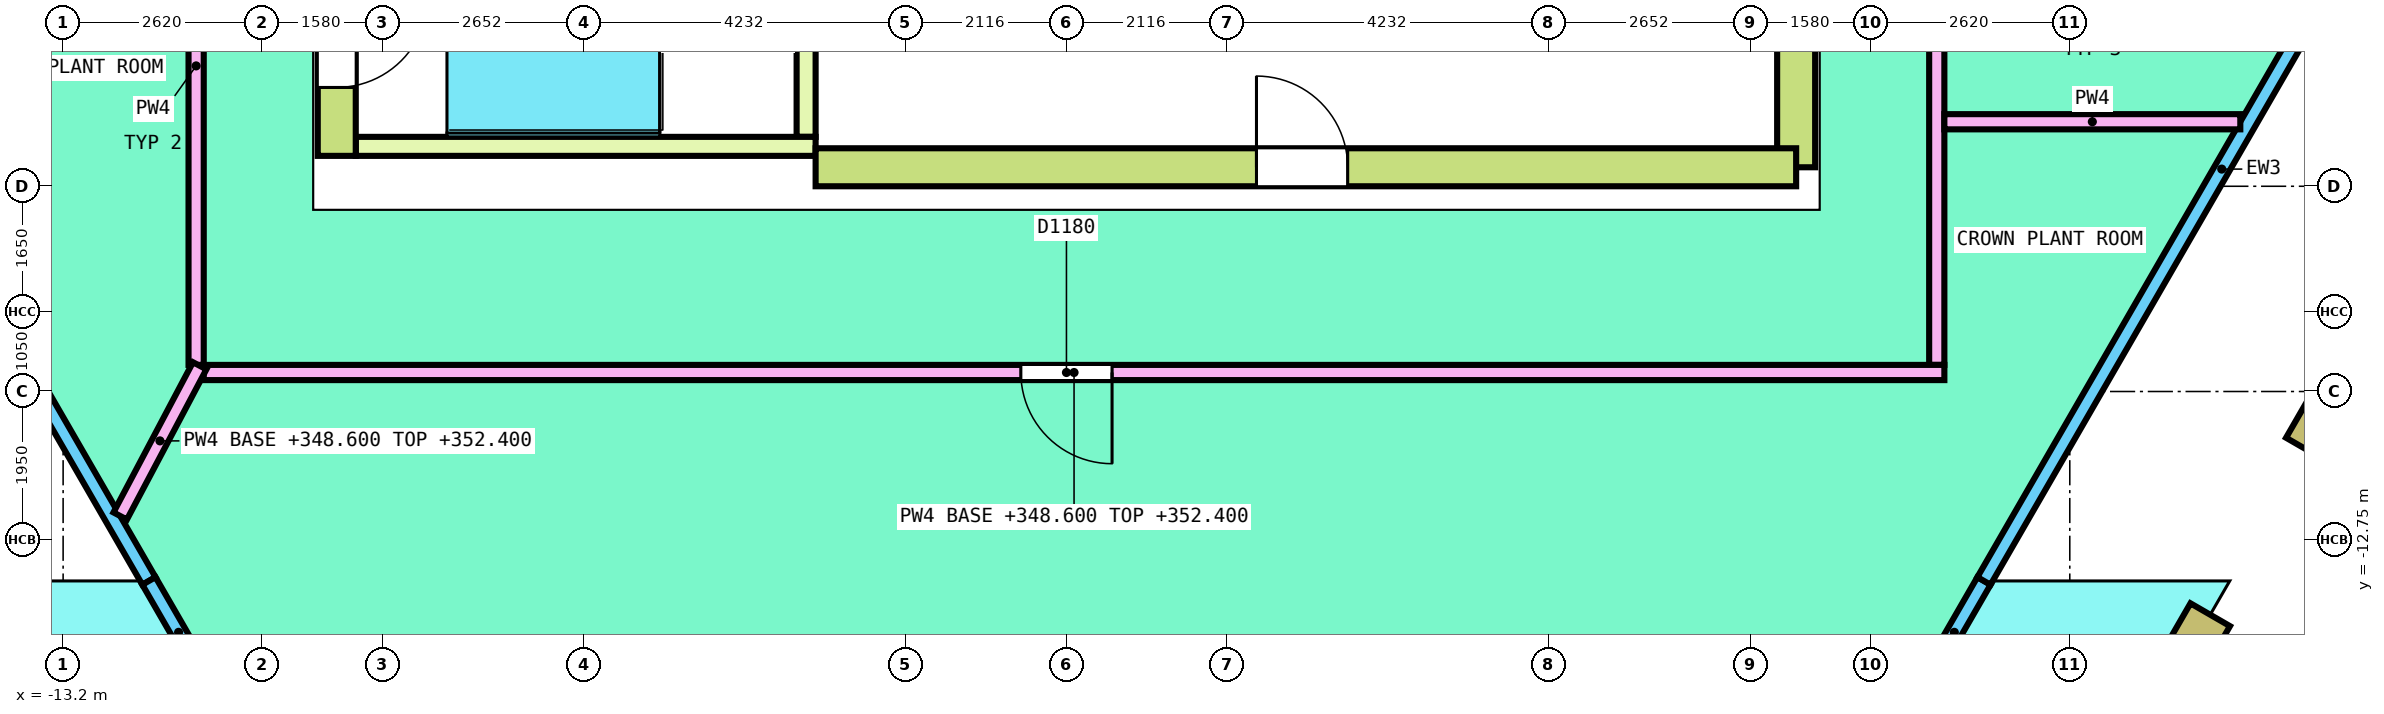
"""IFC4 building model, lengths in metres.
Left out: names, types, materials, properties, quantities, classifications, styles, units other than length and angle.
Written with IfcOpenShell. Run it as: python <this file> out.ifc"""

import sys

from ifc_helpers import new_model, si_unit, direction, frame, frame_2d, origin, origin_2d, place, context, subcontext, project, spatial, polyline, rectangle, hollow_rectangle, outline, extrude, element, fill, save


model = new_model("IFC4")
c1 = context("Model", 3, precision=1e-05, world=origin(), true_north=direction((0.0, 1.0)))
c2 = subcontext(c1, "Body", "Model", "MODEL_VIEW")
j1 = project(units=[si_unit("LENGTHUNIT", "METRE"), si_unit("PLANEANGLEUNIT", "RADIAN")], contexts=[c1])
p1 = place(None, origin())
s1 = spatial("IfcSite", under=j1, at=p1, CompositionType="ELEMENT")
p2 = place(p1, origin())
s2 = spatial("IfcBuilding", under=s1, at=p2, CompositionType="ELEMENT")
p3 = place(p2, frame((0.0, 0.0, 348.6)))
s3 = spatial("IfcBuildingStorey", under=s2, at=p3, CompositionType="ELEMENT", Elevation=348.6)
p4 = place(p3, frame((14.898, -13.996, 0.0), z_axis=(0.0, 0.0, 1.0), x_axis=(0.5, 0.866025403784, 0.0)))
e1 = element("IfcColumn", 1, at=p4, inside=s3, PredefinedType="COLUMN", context=c2, shape_type="SweptSolid", body=[
    extrude(hollow_rectangle(XDim=0.6, YDim=0.6, WallThickness=0.04, InnerFilletRadius=0.04, OuterFilletRadius=0.08, at=origin_2d()), origin(), (0.0, 0.0, 1.0), 2.111),
])
p5 = place(p3, frame((16.455, -11.299, 0.0), z_axis=(0.0, 0.0, 1.0), x_axis=(0.5, 0.866025403784, 0.0)))
e2 = element("IfcColumn", 2, at=p5, inside=s3, PredefinedType="COLUMN", context=c2, shape_type="SweptSolid", body=[
    extrude(hollow_rectangle(XDim=0.6, YDim=0.6, WallThickness=0.04, InnerFilletRadius=0.04, OuterFilletRadius=0.08, at=origin_2d()), origin(), (0.0, 0.0, 1.0), 4.0),
])
p6 = place(p3, frame((-18.327, -2.456, 0.0), z_axis=(0.0, 0.0, 1.0), x_axis=(0.499996062888, -0.866027676865, 0.0)))
e3 = element("IfcWall", 3, at=p6, inside=s3, PredefinedType="SOLIDWALL", context=c2, shape_type="SweptSolid", body=[
    extrude(outline(polyline([(-0.027, -0.1), (12.513, -0.1), (12.513, 0.1), (0.027, 0.1), (-0.027, -0.1)])), origin(), (0.0, 0.0, 1.0), 3.8),
])
p7 = place(p3, frame((-12.071, -13.292, 0.0), z_axis=(0.0, 0.0, 1.0), x_axis=(0.499957096737, -0.866050172578, 0.0)))
e4 = element("IfcWall", 4, at=p7, inside=s3, PredefinedType="SOLIDWALL", context=c2, shape_type="SweptSolid", body=[
    extrude(outline(polyline([(0.0, 0.0), (1.561, 0.0), (1.561, 1.457), (0.0, 4.0), (0.0, 0.0)])), frame((0.0, 0.1, 0.0), z_axis=(0.0, -1.0, 0.0), x_axis=(1.0, 0.0, 0.0)), (0.0, 0.0, 1.0), 0.2),
])
p8 = place(p3, frame((11.291, -14.644, 0.0), z_axis=(0.0, 0.0, 1.0), x_axis=(0.499957096737, 0.866050172578, 0.0)))
e5 = element("IfcWall", 5, at=p8, inside=s3, PredefinedType="SOLIDWALL", context=c2, shape_type="SweptSolid", body=[
    extrude(outline(polyline([(0.0, 0.0), (1.561, 0.0), (1.561, 4.0), (0.0, 1.457), (0.0, 0.0)])), frame((0.0, 0.1, 0.0), z_axis=(0.0, -1.0, 0.0), x_axis=(1.0, 0.0, 0.0)), (0.0, 0.0, 1.0), 0.2),
])
p9 = place(p3, frame((12.071, -13.292, 0.0), z_axis=(0.0, 0.0, 1.0), x_axis=(0.499996062888, 0.866027676865, 0.0)))
e6 = element("IfcWall", 6, at=p9, inside=s3, PredefinedType="SOLIDWALL", context=c2, shape_type="SweptSolid", body=[
    extrude(outline(polyline([(0.0, -0.1), (12.54, -0.1), (12.486, 0.1), (0.0, 0.1), (0.0, -0.1)])), origin(), (0.0, 0.0, 1.0), 3.8),
])
p10 = place(p3, frame((9.6, -7.85, 0.0), z_axis=(0.0, 0.0, 1.0), x_axis=(0.0, 1.0, 0.0)))
e7 = element("IfcWall", 7, at=p10, inside=s3, PredefinedType="SHEAR", context=c2, shape_type="SweptSolid", body=[
    extrude(rectangle(XDim=9.35, YDim=0.5, at=frame_2d((4.675, 0.0))), origin(), (0.0, 0.0, 1.0), 3.8),
])
p11 = place(p10, frame((8.15, 0.0, 0.0)))
e8 = element("IfcOpeningElement", 8, at=p11, cuts=e7, PredefinedType="OPENING", context=c2, shape_type="SweptSolid", body=[
    extrude(rectangle(XDim=0.9, YDim=2.1, at=frame_2d((0.45, 1.05))), frame((0.0, 0.26, 0.0), z_axis=(0.0, -1.0, 0.0), x_axis=(1.0, 0.0, 0.0)), (0.0, 0.0, 1.0), 0.52),
])
p12 = place(p3, frame((-3.3, -7.85, 0.0), z_axis=(0.0, 0.0, 1.0), x_axis=(1.0, 0.0, 0.0)))
e9 = element("IfcWall", 9, at=p12, inside=s3, PredefinedType="SHEAR", context=c2, shape_type="SweptSolid", body=[
    extrude(rectangle(XDim=12.9, YDim=0.5, at=frame_2d((6.45, 0.0))), origin(), (0.0, 0.0, 1.0), 3.8),
])
p13 = place(p12, frame((5.8, 0.0, 0.0)))
e10 = element("IfcOpeningElement", 10, at=p13, cuts=e9, PredefinedType="OPENING", context=c2, shape_type="SweptSolid", body=[
    extrude(rectangle(XDim=1.2, YDim=2.1, at=frame_2d((0.6, 1.05))), frame((0.0, 0.26, 0.0), z_axis=(0.0, -1.0, 0.0), x_axis=(1.0, 0.0, 0.0)), (0.0, 0.0, 1.0), 0.52),
])
p14 = place(p3, frame((-9.6, -7.7, 0.0), z_axis=(0.0, 0.0, 1.0), x_axis=(0.0, 1.0, 0.0)))
e11 = element("IfcWall", 11, at=p14, inside=s3, PredefinedType="SHEAR", context=c2, shape_type="SweptSolid", body=[
    extrude(rectangle(XDim=3.05, YDim=0.5, at=frame_2d((1.525, 0.0))), origin(), (0.0, 0.0, 1.0), 3.8),
])
p15 = place(p14, frame((0.9, 0.0, 0.0)))
e12 = element("IfcOpeningElement", 12, at=p15, cuts=e11, PredefinedType="OPENING", context=c2, shape_type="SweptSolid", body=[
    extrude(rectangle(XDim=1.2, YDim=2.1, at=frame_2d((0.6, 1.05))), frame((0.0, 0.26, 0.0), z_axis=(0.0, -1.0, 0.0), x_axis=(1.0, 0.0, 0.0)), (0.0, 0.0, 1.0), 0.52),
])
p16 = place(p3, frame((-3.425, -7.45, 0.0), z_axis=(0.0, 0.0, 1.0), x_axis=(0.0, 1.0, 0.0)))
e13 = element("IfcWall", 13, at=p16, inside=s3, PredefinedType="SOLIDWALL", context=c2, shape_type="SweptSolid", body=[
    extrude(rectangle(XDim=2.55, YDim=0.25, at=frame_2d((1.275, 0.0))), origin(), (0.0, 0.0, 1.0), 3.8),
])
p17 = place(p3, frame((-9.35, -7.575, 0.0), z_axis=(0.0, 0.0, 1.0), x_axis=(1.0, 0.0, 0.0)))
e14 = element("IfcWall", 14, at=p17, inside=s3, PredefinedType="SOLIDWALL", context=c2, shape_type="SweptSolid", body=[
    extrude(rectangle(XDim=6.05, YDim=0.25, at=frame_2d((3.025, 0.0))), origin(), (0.0, 0.0, 1.0), 3.8),
])
p18 = place(p3, frame((11.45, -10.45, 0.0), z_axis=(0.0, 0.0, 1.0), x_axis=(0.0, 1.0, 0.0)))
e15 = element("IfcWall", 15, at=p18, inside=s3, PredefinedType="PARTITIONING", context=c2, shape_type="SweptSolid", body=[
    extrude(rectangle(XDim=7.867, YDim=0.2, at=frame_2d((3.934, 0.0))), origin(), (0.0, 0.0, 1.0), 3.3),
])
p19 = place(p18, frame((5.543, 0.0, 0.0)))
e16 = element("IfcOpeningElement", 16, at=p19, cuts=e15, PredefinedType="OPENING", context=c2, shape_type="SweptSolid", body=[
    extrude(rectangle(XDim=1.0, YDim=2.1, at=frame_2d((0.5, 1.05))), frame((0.0, 0.11, 0.0), z_axis=(0.0, -1.0, 0.0), x_axis=(1.0, 0.0, 0.0)), (0.0, 0.0, 1.0), 0.22),
])
p20 = place(p3, frame((-11.45, -10.45, 0.0), z_axis=(0.0, 0.0, 1.0), x_axis=(0.0, 1.0, 0.0)))
e17 = element("IfcWall", 17, at=p20, inside=s3, PredefinedType="PARTITIONING", context=c2, shape_type="SweptSolid", body=[
    extrude(rectangle(XDim=7.867, YDim=0.2, at=frame_2d((3.934, 0.0))), origin(), (0.0, 0.0, 1.0), 3.3),
])
p21 = place(p20, frame((4.389, 0.0, 0.0)))
e18 = element("IfcOpeningElement", 18, at=p21, cuts=e17, PredefinedType="OPENING", context=c2, shape_type="SweptSolid", body=[
    extrude(rectangle(XDim=1.0, YDim=2.1, at=frame_2d((0.5, 1.05))), frame((0.0, 0.11, 0.0), z_axis=(0.0, -1.0, 0.0), x_axis=(1.0, 0.0, 0.0)), (0.0, 0.0, 1.0), 0.22),
])
p22 = place(p3, frame((-11.35, -10.55, 0.0), z_axis=(0.0, 0.0, 1.0), x_axis=(1.0, 0.0, 0.0)))
e19 = element("IfcWall", 19, at=p22, inside=s3, PredefinedType="PARTITIONING", context=c2, shape_type="SweptSolid", body=[
    extrude(rectangle(XDim=22.9, YDim=0.2, at=frame_2d((11.45, 0.0))), origin(), (0.0, 0.0, 1.0), 3.8),
])
p23 = place(p22, frame((10.75, 0.0, 0.0)))
e20 = element("IfcOpeningElement", 20, at=p23, cuts=e19, PredefinedType="OPENING", context=c2, shape_type="SweptSolid", body=[
    extrude(rectangle(XDim=1.2, YDim=2.1, at=frame_2d((0.6, 1.05))), frame((0.0, 0.11, 0.0), z_axis=(0.0, -1.0, 0.0), x_axis=(1.0, 0.0, 0.0)), (0.0, 0.0, 1.0), 0.22),
])
p24 = place(p3, frame((-12.449, -12.438, 0.0), z_axis=(0.0, 0.0, 1.0), x_axis=(0.467712102585, 0.883880868158, 0.0)))
e21 = element("IfcWall", 21, at=p24, inside=s3, PredefinedType="PARTITIONING", context=c2, shape_type="SweptSolid", body=[
    extrude(rectangle(XDim=2.236, YDim=0.2, at=frame_2d((1.118, 0.0))), origin(), (0.0, 0.0, 1.0), 3.8),
])
p25 = place(p3, frame((11.55, -7.251, 0.0), z_axis=(0.0, 0.0, 1.0), x_axis=(1.0, 0.0, 0.0)))
e22 = element("IfcWall", 22, at=p25, inside=s3, PredefinedType="PARTITIONING", context=c2, shape_type="SweptSolid", body=[
    extrude(rectangle(XDim=3.893, YDim=0.2, at=frame_2d((1.947, 0.0))), origin(), (0.0, 0.0, 1.0), 3.3),
])
p26 = place(p15, origin())
e23 = element("IfcDoor", 23, at=p26, inside=s3, OperationType="SINGLE_SWING_LEFT", PredefinedType="DOOR", context=c2, shape_type="SweptSolid", body=[
    extrude(rectangle(XDim=1.2, YDim=2.1, at=frame_2d((0.6, 1.05))), frame((0.0, 0.2, 0.0), z_axis=(0.0, -1.0, 0.0), x_axis=(1.0, 0.0, 0.0)), (0.0, 0.0, 1.0), 0.4),
])
fill(e12, e23)
p27 = place(p13, origin())
e24 = element("IfcDoor", 24, at=p27, inside=s3, OperationType="SINGLE_SWING_LEFT", PredefinedType="DOOR", context=c2, shape_type="SweptSolid", body=[
    extrude(rectangle(XDim=1.2, YDim=2.1, at=frame_2d((0.6, 1.05))), frame((0.0, 0.2, 0.0), z_axis=(0.0, -1.0, 0.0), x_axis=(1.0, 0.0, 0.0)), (0.0, 0.0, 1.0), 0.4),
])
fill(e10, e24)
p28 = place(p23, origin())
e25 = element("IfcDoor", 25, at=p28, inside=s3, OperationType="DOUBLE_DOOR_SINGLE_SWING", PredefinedType="DOOR", context=c2, shape_type="SweptSolid", body=[
    extrude(rectangle(XDim=1.2, YDim=2.1, at=frame_2d((0.6, 1.05))), frame((0.0, 0.025, 0.0), z_axis=(0.0, -1.0, 0.0), x_axis=(1.0, 0.0, 0.0)), (0.0, 0.0, 1.0), 0.05),
])
fill(e20, e25)
save(model, sys.argv[1])
